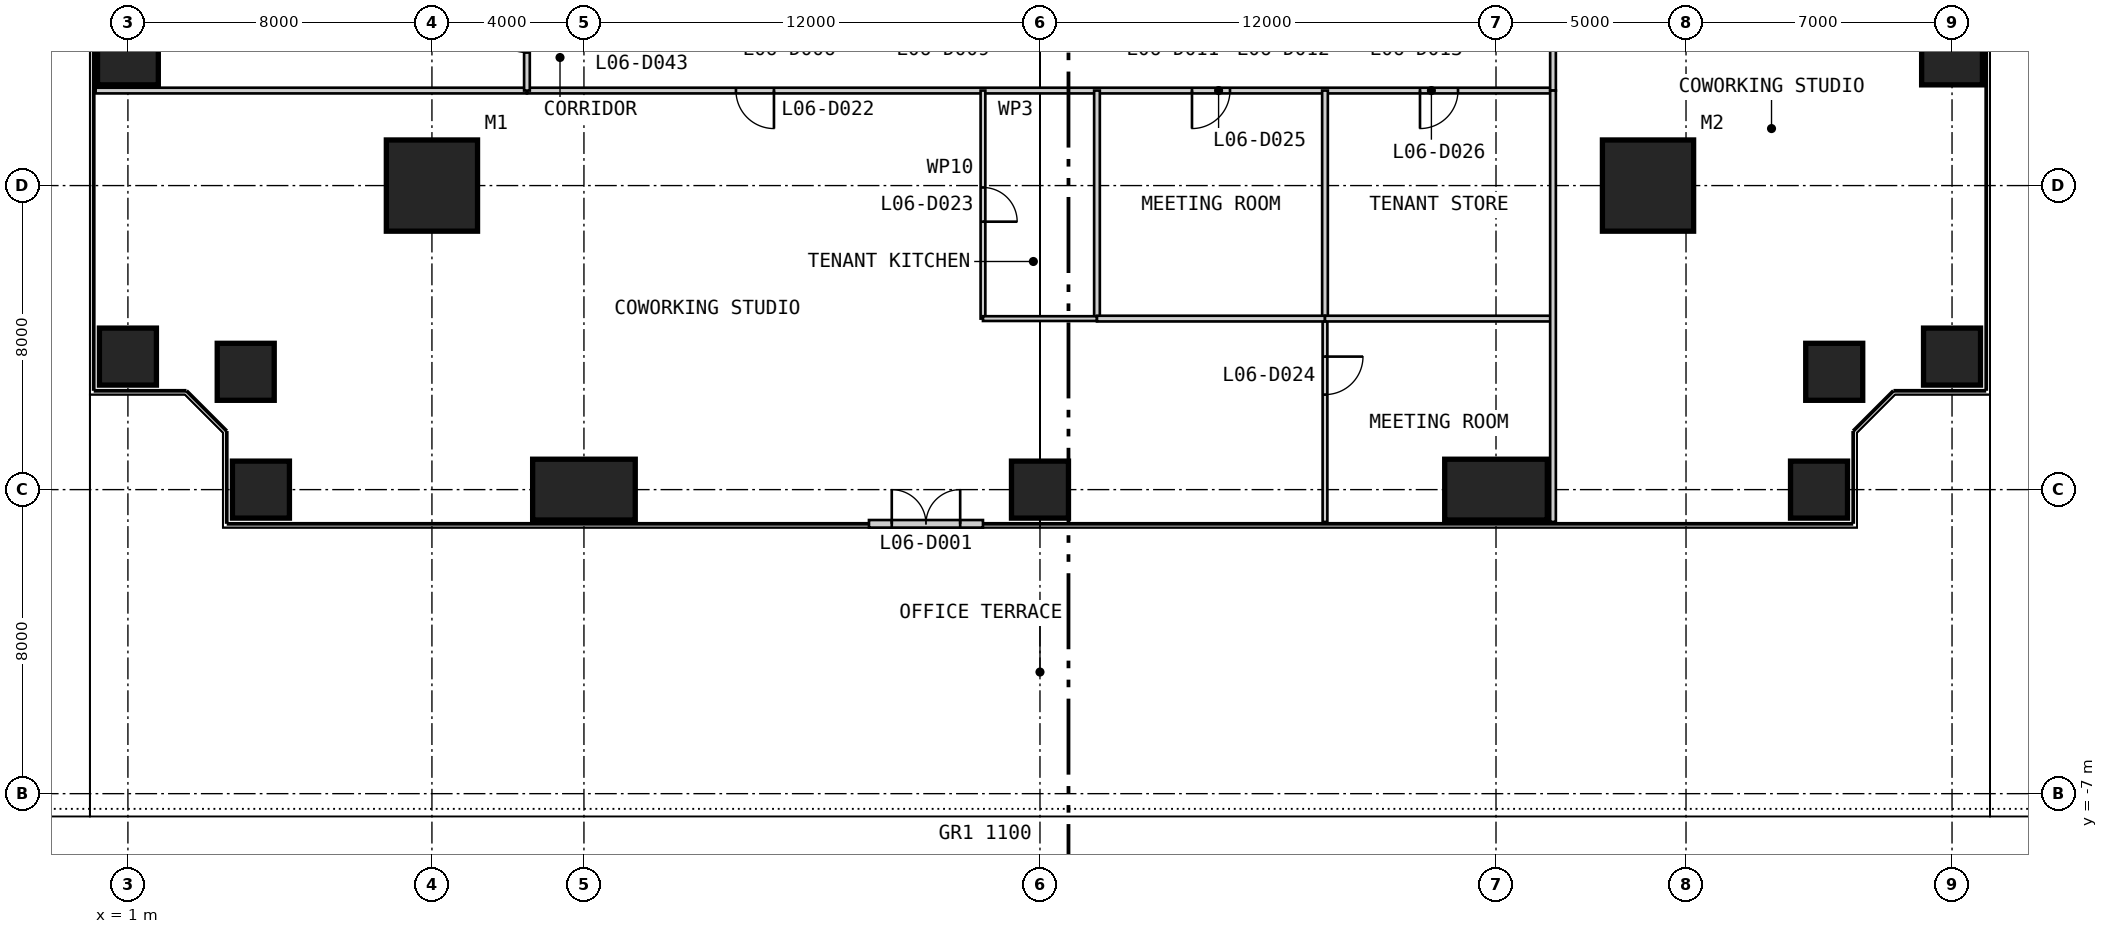
"""IFC4 building model, lengths in metres.
Left out: names, types, materials, properties, quantities, classifications, styles, units other than length and angle.
Written with IfcOpenShell. Run it as: python <this file> out.ifc"""

import sys

from ifc_helpers import new_model, si_unit, direction, frame, frame_2d, origin, origin_2d, place, context, subcontext, project, spatial, rectangle, extrude, element, fill, save


model = new_model("IFC4")
c1 = context("Model", 3, precision=1e-05, world=origin(), true_north=direction((0.0, 1.0)))
c2 = subcontext(c1, "Body", "Model", "MODEL_VIEW")
j1 = project(units=[si_unit("LENGTHUNIT", "METRE"), si_unit("PLANEANGLEUNIT", "RADIAN")], contexts=[c1])
p1 = place(None, origin())
s1 = spatial("IfcSite", under=j1, at=p1, CompositionType="ELEMENT")
p2 = place(p1, origin())
s2 = spatial("IfcBuilding", under=s1, at=p2, CompositionType="ELEMENT")
p3 = place(p2, frame((0.0, 0.0, 31.0)))
s3 = spatial("IfcBuildingStorey", under=s2, at=p3, CompositionType="ELEMENT", Elevation=31.0)
for number, where, z_axis, x_axis in (
    (1, (9.0, 9.0, 0.0), (0.0, 0.0, 1.0), (1.0, 0.0, 0.0)),
    (2, (41.0, 9.0, 0.0), (0.0, 0.0, 1.0), (1.0, 0.0, 0.0)),
):
    element("IfcColumn", number, at=place(p3, frame(where, z_axis=z_axis, x_axis=x_axis)), inside=s3, PredefinedType="COLUMN", context=c2, shape_type="SweptSolid", body=[
        extrude(rectangle(XDim=2.4, YDim=2.4, at=origin_2d()), origin(), (0.0, 0.0, 1.0), 4.0),
    ])
p4 = place(p3, frame((4.5, 1.0, 0.0), z_axis=(0.0, 0.0, 1.0), x_axis=(1.0, 0.0, 0.0)))
e3 = element("IfcColumn", 3, at=p4, inside=s3, PredefinedType="COLUMN", context=c2, shape_type="SweptSolid", body=[
    extrude(rectangle(XDim=1.5, YDim=1.5, at=origin_2d()), origin(), (0.0, 0.0, 1.0), 4.0),
])
p5 = place(p3, frame((13.0, 1.0, 0.0), z_axis=(0.0, 0.0, 1.0), x_axis=(1.0, 0.0, 0.0)))
e4 = element("IfcColumn", 4, at=p5, inside=s3, PredefinedType="COLUMN", context=c2, shape_type="SweptSolid", body=[
    extrude(rectangle(XDim=2.7, YDim=1.6, at=origin_2d()), origin(), (0.0, 0.0, 1.0), 4.0),
])
p6 = place(p3, frame((25.0, 1.0, 0.0), z_axis=(0.0, 0.0, 1.0), x_axis=(1.0, 0.0, 0.0)))
e5 = element("IfcColumn", 5, at=p6, inside=s3, PredefinedType="COLUMN", context=c2, shape_type="SweptSolid", body=[
    extrude(rectangle(XDim=1.5, YDim=1.5, at=origin_2d()), origin(), (0.0, 0.0, 1.0), 4.0),
])
p7 = place(p3, frame((37.0, 1.0, 0.0), z_axis=(0.0, 0.0, 1.0), x_axis=(1.0, 0.0, 0.0)))
e6 = element("IfcColumn", 6, at=p7, inside=s3, PredefinedType="COLUMN", context=c2, shape_type="SweptSolid", body=[
    extrude(rectangle(XDim=2.7, YDim=1.6, at=origin_2d()), origin(), (0.0, 0.0, 1.0), 4.0),
])
for number, where, z_axis, x_axis in (
    (7, (45.5, 1.0, 0.0), (0.0, 0.0, 1.0), (1.0, 0.0, 0.0)),
    (8, (45.9, 4.1, 0.0), (0.0, 0.0, 1.0), (1.0, 0.0, 0.0)),
    (9, (49.0, 4.5, 0.0), (0.0, 0.0, 1.0), (1.0, 0.0, 0.0)),
):
    element("IfcColumn", number, at=place(p3, frame(where, z_axis=z_axis, x_axis=x_axis)), inside=s3, PredefinedType="COLUMN", context=c2, shape_type="SweptSolid", body=[
        extrude(rectangle(XDim=1.5, YDim=1.5, at=origin_2d()), origin(), (0.0, 0.0, 1.0), 4.0),
    ])
for number, where, z_axis, x_axis in (
    (10, (49.0, 13.0, 0.0), (0.0, 0.0, 1.0), (1.0, 0.0, 0.0)),
    (11, (1.0, 13.0, 0.0), (0.0, 0.0, 1.0), (1.0, 0.0, 0.0)),
):
    element("IfcColumn", number, at=place(p3, frame(where, z_axis=z_axis, x_axis=x_axis)), inside=s3, PredefinedType="COLUMN", context=c2, shape_type="SweptSolid", body=[
        extrude(rectangle(XDim=1.6, YDim=2.7, at=origin_2d()), origin(), (0.0, 0.0, 1.0), 4.0),
    ])
for number, where, z_axis, x_axis in (
    (12, (1.0, 4.5, 0.0), (0.0, 0.0, 1.0), (1.0, 0.0, 0.0)),
    (13, (4.1, 4.1, 0.0), (0.0, 0.0, 1.0), (1.0, 0.0, 0.0)),
):
    element("IfcColumn", number, at=place(p3, frame(where, z_axis=z_axis, x_axis=x_axis)), inside=s3, PredefinedType="COLUMN", context=c2, shape_type="SweptSolid", body=[
        extrude(rectangle(XDim=1.5, YDim=1.5, at=origin_2d()), origin(), (0.0, 0.0, 1.0), 4.0),
    ])
p8 = place(p3, frame((20.5, 0.1, 0.0), z_axis=(0.0, 0.0, 1.0), x_axis=(1.0, 0.0, 0.0)))
e14 = element("IfcWall", 14, at=p8, inside=s3, PredefinedType="SOLIDWALL", context=c2, shape_type="SweptSolid", body=[
    extrude(rectangle(XDim=3.0, YDim=0.2, at=frame_2d((1.5, 0.0))), origin(), (0.0, 0.0, 1.0), 3.85),
])
p9 = place(p8, frame((0.6, 0.0, 0.0)))
e15 = element("IfcOpeningElement", 15, at=p9, cuts=e14, PredefinedType="OPENING", context=c2, shape_type="SweptSolid", body=[
    extrude(rectangle(XDim=1.8, YDim=2.4, at=frame_2d((0.9, 1.2))), frame((0.0, 0.11, 0.0), z_axis=(0.0, -1.0, 0.0), x_axis=(1.0, 0.0, 0.0)), (0.0, 0.0, 1.0), 0.22),
])
p10 = place(p3, frame((11.5, 11.5, 0.0), z_axis=(0.0, 0.0, 1.0), x_axis=(1.0, 0.0, 0.0)))
e16 = element("IfcWall", 16, at=p10, inside=s3, PredefinedType="PARTITIONING", context=c2, shape_type="SweptSolid", body=[
    extrude(rectangle(XDim=27.0, YDim=0.15, at=frame_2d((13.5, 0.0))), origin(), (0.0, 0.0, 1.0), 3.85),
])
p11 = place(p10, frame((5.5, 0.0, 0.0)))
e17 = element("IfcOpeningElement", 17, at=p11, cuts=e16, PredefinedType="OPENING", context=c2, shape_type="SweptSolid", body=[
    extrude(rectangle(XDim=1.0, YDim=2.2, at=frame_2d((0.5, 1.1))), frame((0.0, 0.085, 0.0), z_axis=(0.0, -1.0, 0.0), x_axis=(1.0, 0.0, 0.0)), (0.0, 0.0, 1.0), 0.17),
])
p12 = place(p10, frame((17.5, 0.0, 0.0)))
e18 = element("IfcOpeningElement", 18, at=p12, cuts=e16, PredefinedType="OPENING", context=c2, shape_type="SweptSolid", body=[
    extrude(rectangle(XDim=1.0, YDim=2.2, at=frame_2d((0.5, 1.1))), frame((0.0, 0.085, 0.0), z_axis=(0.0, -1.0, 0.0), x_axis=(1.0, 0.0, 0.0)), (0.0, 0.0, 1.0), 0.17),
])
p13 = place(p10, frame((23.5, 0.0, 0.0)))
e19 = element("IfcOpeningElement", 19, at=p13, cuts=e16, PredefinedType="OPENING", context=c2, shape_type="SweptSolid", body=[
    extrude(rectangle(XDim=1.0, YDim=2.2, at=frame_2d((0.5, 1.1))), frame((0.0, 0.085, 0.0), z_axis=(0.0, -1.0, 0.0), x_axis=(1.0, 0.0, 0.0)), (0.0, 0.0, 1.0), 0.17),
])
p14 = place(p3, frame((0.15, 11.5, 0.0), z_axis=(0.0, 0.0, 1.0), x_axis=(1.0, 0.0, 0.0)))
e20 = element("IfcWall", 20, at=p14, inside=s3, PredefinedType="PARTITIONING", context=c2, shape_type="SweptSolid", body=[
    extrude(rectangle(XDim=11.35, YDim=0.15, at=frame_2d((5.675, 0.0))), origin(), (0.0, 0.0, 1.0), 3.85),
])
p15 = place(p3, frame((23.5, 5.5, 0.0), z_axis=(0.0, 0.0, 1.0), x_axis=(0.0, 1.0, 0.0)))
e21 = element("IfcWall", 21, at=p15, inside=s3, PredefinedType="PARTITIONING", context=c2, shape_type="SweptSolid", body=[
    extrude(rectangle(XDim=6.0, YDim=0.125, at=frame_2d((3.0, 0.0))), origin(), (0.0, 0.0, 1.0), 3.85),
])
p16 = place(p15, frame((2.55, 0.0, 0.0)))
e22 = element("IfcOpeningElement", 22, at=p16, cuts=e21, PredefinedType="OPENING", context=c2, shape_type="SweptSolid", body=[
    extrude(rectangle(XDim=0.9, YDim=2.2, at=frame_2d((0.45, 1.1))), frame((0.0, 0.073, 0.0), z_axis=(0.0, -1.0, 0.0), x_axis=(1.0, 0.0, 0.0)), (0.0, 0.0, 1.0), 0.145),
])
p17 = place(p3, frame((26.5, 5.5, 0.0), z_axis=(0.0, 0.0, 1.0), x_axis=(0.0, 1.0, 0.0)))
e23 = element("IfcWall", 23, at=p17, inside=s3, PredefinedType="PARTITIONING", context=c2, shape_type="SweptSolid", body=[
    extrude(rectangle(XDim=6.0, YDim=0.15, at=frame_2d((3.0, 0.0))), origin(), (0.0, 0.0, 1.0), 3.85),
])
p18 = place(p3, frame((32.5, 0.15, 0.0), z_axis=(0.0, 0.0, 1.0), x_axis=(0.0, 1.0, 0.0)))
e24 = element("IfcWall", 24, at=p18, inside=s3, PredefinedType="PARTITIONING", context=c2, shape_type="SweptSolid", body=[
    extrude(rectangle(XDim=5.35, YDim=0.125, at=frame_2d((2.675, 0.0))), origin(), (0.0, 0.0, 1.0), 3.85),
])
p19 = place(p18, frame((3.35, 0.0, 0.0)))
e25 = element("IfcOpeningElement", 25, at=p19, cuts=e24, PredefinedType="OPENING", context=c2, shape_type="SweptSolid", body=[
    extrude(rectangle(XDim=1.0, YDim=2.2, at=frame_2d((0.5, 1.1))), frame((0.0, 0.073, 0.0), z_axis=(0.0, -1.0, 0.0), x_axis=(1.0, 0.0, 0.0)), (0.0, 0.0, 1.0), 0.145),
])
p20 = place(p3, frame((32.5, 5.5, 0.0), z_axis=(0.0, 0.0, 1.0), x_axis=(0.0, 1.0, 0.0)))
e26 = element("IfcWall", 26, at=p20, inside=s3, PredefinedType="PARTITIONING", context=c2, shape_type="SweptSolid", body=[
    extrude(rectangle(XDim=6.0, YDim=0.15, at=frame_2d((3.0, 0.0))), origin(), (0.0, 0.0, 1.0), 3.85),
])
p21 = place(p3, frame((23.5, 5.5, 0.0), z_axis=(0.0, 0.0, 1.0), x_axis=(1.0, 0.0, 0.0)))
e27 = element("IfcWall", 27, at=p21, inside=s3, PredefinedType="PARTITIONING", context=c2, shape_type="SweptSolid", body=[
    extrude(rectangle(XDim=3.0, YDim=0.125, at=frame_2d((1.5, 0.0))), origin(), (0.0, 0.0, 1.0), 3.85),
])
for number, where, z_axis, x_axis in (
    (28, (26.5, 5.5, 0.0), (0.0, 0.0, 1.0), (1.0, 0.0, 0.0)),
    (29, (32.5, 5.5, 0.0), (0.0, 0.0, 1.0), (1.0, 0.0, 0.0)),
):
    element("IfcWall", number, at=place(p3, frame(where, z_axis=z_axis, x_axis=x_axis)), inside=s3, PredefinedType="PARTITIONING", context=c2, shape_type="SweptSolid", body=[
        extrude(rectangle(XDim=6.0, YDim=0.15, at=frame_2d((3.0, 0.0))), origin(), (0.0, 0.0, 1.0), 3.85),
    ])
p22 = place(p3, frame((38.5, 11.5, 0.0), z_axis=(0.0, 0.0, 1.0), x_axis=(0.0, 1.0, 0.0)))
e30 = element("IfcWall", 30, at=p22, inside=s3, PredefinedType="PARTITIONING", context=c2, shape_type="SweptSolid", body=[
    extrude(rectangle(XDim=27.0, YDim=0.15, at=frame_2d((13.5, 0.0))), origin(), (0.0, 0.0, 1.0), 3.85),
])
p23 = place(p22, frame((2.5, 0.0, 0.0)))
e31 = element("IfcOpeningElement", 31, at=p23, cuts=e30, PredefinedType="OPENING", context=c2, shape_type="SweptSolid", body=[
    extrude(rectangle(XDim=1.0, YDim=2.2, at=frame_2d((0.5, 1.1))), frame((0.0, 0.085, 0.0), z_axis=(0.0, -1.0, 0.0), x_axis=(1.0, 0.0, 0.0)), (0.0, 0.0, 1.0), 0.17),
])
p24 = place(p22, frame((11.5, 0.0, 0.0)))
e32 = element("IfcOpeningElement", 32, at=p24, cuts=e30, PredefinedType="OPENING", context=c2, shape_type="SweptSolid", body=[
    extrude(rectangle(XDim=1.0, YDim=2.2, at=frame_2d((0.5, 1.1))), frame((0.0, 0.085, 0.0), z_axis=(0.0, -1.0, 0.0), x_axis=(1.0, 0.0, 0.0)), (0.0, 0.0, 1.0), 0.17),
])
p25 = place(p22, frame((17.5, 0.0, 0.0)))
e33 = element("IfcOpeningElement", 33, at=p25, cuts=e30, PredefinedType="OPENING", context=c2, shape_type="SweptSolid", body=[
    extrude(rectangle(XDim=1.0, YDim=2.2, at=frame_2d((0.5, 1.1))), frame((0.0, 0.085, 0.0), z_axis=(0.0, -1.0, 0.0), x_axis=(1.0, 0.0, 0.0)), (0.0, 0.0, 1.0), 0.17),
])
p26 = place(p22, frame((22.0, 0.0, 0.0)))
e34 = element("IfcOpeningElement", 34, at=p26, cuts=e30, PredefinedType="OPENING", context=c2, shape_type="SweptSolid", body=[
    extrude(rectangle(XDim=1.0, YDim=2.2, at=frame_2d((0.5, 1.1))), frame((0.0, 0.085, 0.0), z_axis=(0.0, -1.0, 0.0), x_axis=(1.0, 0.0, 0.0)), (0.0, 0.0, 1.0), 0.17),
])
p27 = place(p22, frame((25.0, 0.0, 0.0)))
e35 = element("IfcOpeningElement", 35, at=p27, cuts=e30, PredefinedType="OPENING", context=c2, shape_type="SweptSolid", body=[
    extrude(rectangle(XDim=1.0, YDim=2.2, at=frame_2d((0.5, 1.1))), frame((0.0, 0.085, 0.0), z_axis=(0.0, -1.0, 0.0), x_axis=(1.0, 0.0, 0.0)), (0.0, 0.0, 1.0), 0.17),
])
p28 = place(p3, frame((38.5, 0.15, 0.0), z_axis=(0.0, 0.0, 1.0), x_axis=(0.0, 1.0, 0.0)))
e36 = element("IfcWall", 36, at=p28, inside=s3, PredefinedType="PARTITIONING", context=c2, shape_type="SweptSolid", body=[
    extrude(rectangle(XDim=11.35, YDim=0.15, at=frame_2d((5.675, 0.0))), origin(), (0.0, 0.0, 1.0), 3.85),
])
p29 = place(p3, frame((11.5, 38.5, 0.0), z_axis=(0.0, 0.0, 1.0), x_axis=(0.0, -1.0, 0.0)))
e37 = element("IfcWall", 37, at=p29, inside=s3, PredefinedType="PARTITIONING", context=c2, shape_type="SweptSolid", body=[
    extrude(rectangle(XDim=27.0, YDim=0.15, at=frame_2d((13.5, 0.0))), origin(), (0.0, 0.0, 1.0), 3.85),
])
p30 = place(p29, frame((2.5, 0.0, 0.0)))
e38 = element("IfcOpeningElement", 38, at=p30, cuts=e37, PredefinedType="OPENING", context=c2, shape_type="SweptSolid", body=[
    extrude(rectangle(XDim=1.0, YDim=2.2, at=frame_2d((0.5, 1.1))), frame((0.0, 0.085, 0.0), z_axis=(0.0, -1.0, 0.0), x_axis=(1.0, 0.0, 0.0)), (0.0, 0.0, 1.0), 0.17),
])
p31 = place(p29, frame((11.5, 0.0, 0.0)))
e39 = element("IfcOpeningElement", 39, at=p31, cuts=e37, PredefinedType="OPENING", context=c2, shape_type="SweptSolid", body=[
    extrude(rectangle(XDim=1.0, YDim=2.2, at=frame_2d((0.5, 1.1))), frame((0.0, 0.085, 0.0), z_axis=(0.0, -1.0, 0.0), x_axis=(1.0, 0.0, 0.0)), (0.0, 0.0, 1.0), 0.17),
])
p32 = place(p29, frame((17.5, 0.0, 0.0)))
e40 = element("IfcOpeningElement", 40, at=p32, cuts=e37, PredefinedType="OPENING", context=c2, shape_type="SweptSolid", body=[
    extrude(rectangle(XDim=1.0, YDim=2.2, at=frame_2d((0.5, 1.1))), frame((0.0, 0.085, 0.0), z_axis=(0.0, -1.0, 0.0), x_axis=(1.0, 0.0, 0.0)), (0.0, 0.0, 1.0), 0.17),
])
p33 = place(p29, frame((22.0, 0.0, 0.0)))
e41 = element("IfcOpeningElement", 41, at=p33, cuts=e37, PredefinedType="OPENING", context=c2, shape_type="SweptSolid", body=[
    extrude(rectangle(XDim=1.0, YDim=2.2, at=frame_2d((0.5, 1.1))), frame((0.0, 0.085, 0.0), z_axis=(0.0, -1.0, 0.0), x_axis=(1.0, 0.0, 0.0)), (0.0, 0.0, 1.0), 0.17),
])
p34 = place(p29, frame((25.0, 0.0, 0.0)))
e42 = element("IfcOpeningElement", 42, at=p34, cuts=e37, PredefinedType="OPENING", context=c2, shape_type="SweptSolid", body=[
    extrude(rectangle(XDim=1.0, YDim=2.2, at=frame_2d((0.5, 1.1))), frame((0.0, 0.085, 0.0), z_axis=(0.0, -1.0, 0.0), x_axis=(1.0, 0.0, 0.0)), (0.0, 0.0, 1.0), 0.17),
])
p35 = place(p9, origin())
e43 = element("IfcDoor", 43, at=p35, inside=s3, OperationType="DOUBLE_DOOR_SINGLE_SWING", PredefinedType="DOOR", context=c2, shape_type="SweptSolid", body=[
    extrude(rectangle(XDim=1.8, YDim=2.4, at=frame_2d((0.9, 1.2))), frame((0.0, 0.025, 0.0), z_axis=(0.0, -1.0, 0.0), x_axis=(1.0, 0.0, 0.0)), (0.0, 0.0, 1.0), 0.05),
])
fill(e15, e43)
p36 = place(p11, frame((1.0, 0.0, 0.0), z_axis=(0.0, 0.0, 1.0), x_axis=(-1.0, 0.0, 0.0)))
e44 = element("IfcDoor", 44, at=p36, inside=s3, OperationType="SINGLE_SWING_LEFT", PredefinedType="DOOR", context=c2, shape_type="SweptSolid", body=[
    extrude(rectangle(XDim=1.0, YDim=2.2, at=frame_2d((0.5, 1.1))), frame((0.0, 0.025, 0.0), z_axis=(0.0, -1.0, 0.0), x_axis=(1.0, 0.0, 0.0)), (0.0, 0.0, 1.0), 0.05),
])
fill(e17, e44)
p37 = place(p16, frame((0.9, 0.0, 0.0), z_axis=(0.0, 0.0, 1.0), x_axis=(-1.0, 0.0, 0.0)))
e45 = element("IfcDoor", 45, at=p37, inside=s3, OperationType="SINGLE_SWING_RIGHT", PredefinedType="DOOR", context=c2, shape_type="SweptSolid", body=[
    extrude(rectangle(XDim=0.9, YDim=2.2, at=frame_2d((0.45, 1.1))), frame((0.0, 0.025, 0.0), z_axis=(0.0, -1.0, 0.0), x_axis=(1.0, 0.0, 0.0)), (0.0, 0.0, 1.0), 0.05),
])
fill(e22, e45)
p38 = place(p19, frame((1.0, 0.0, 0.0), z_axis=(0.0, 0.0, 1.0), x_axis=(-1.0, 0.0, 0.0)))
e46 = element("IfcDoor", 46, at=p38, inside=s3, OperationType="SINGLE_SWING_LEFT", PredefinedType="DOOR", context=c2, shape_type="SweptSolid", body=[
    extrude(rectangle(XDim=1.0, YDim=2.2, at=frame_2d((0.5, 1.1))), frame((0.0, 0.025, 0.0), z_axis=(0.0, -1.0, 0.0), x_axis=(1.0, 0.0, 0.0)), (0.0, 0.0, 1.0), 0.05),
])
fill(e25, e46)
p39 = place(p12, frame((1.0, 0.0, 0.0), z_axis=(0.0, 0.0, 1.0), x_axis=(-1.0, 0.0, 0.0)))
e47 = element("IfcDoor", 47, at=p39, inside=s3, OperationType="SINGLE_SWING_RIGHT", PredefinedType="DOOR", context=c2, shape_type="SweptSolid", body=[
    extrude(rectangle(XDim=1.0, YDim=2.2, at=frame_2d((0.5, 1.1))), frame((0.0, 0.025, 0.0), z_axis=(0.0, -1.0, 0.0), x_axis=(1.0, 0.0, 0.0)), (0.0, 0.0, 1.0), 0.05),
])
fill(e18, e47)
p40 = place(p13, frame((1.0, 0.0, 0.0), z_axis=(0.0, 0.0, 1.0), x_axis=(-1.0, 0.0, 0.0)))
e48 = element("IfcDoor", 48, at=p40, inside=s3, OperationType="SINGLE_SWING_RIGHT", PredefinedType="DOOR", context=c2, shape_type="SweptSolid", body=[
    extrude(rectangle(XDim=1.0, YDim=2.2, at=frame_2d((0.5, 1.1))), frame((0.0, 0.025, 0.0), z_axis=(0.0, -1.0, 0.0), x_axis=(1.0, 0.0, 0.0)), (0.0, 0.0, 1.0), 0.05),
])
fill(e19, e48)
save(model, sys.argv[1])
